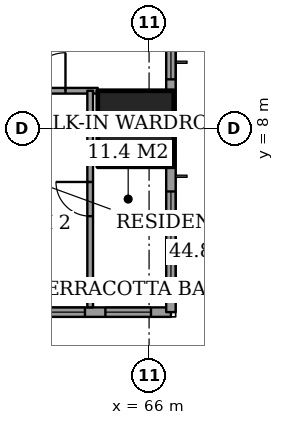
"""IFC4 building model, lengths in metres.
Left out: names, types, materials, properties, quantities, classifications, styles, units other than length and angle.
Written with IfcOpenShell. Run it as: python <this file> out.ifc"""

import sys

from ifc_helpers import new_model, si_unit, direction, frame, frame_2d, origin, origin_2d, place, context, subcontext, project, spatial, rectangle, extrude, element, fill, save


model = new_model("IFC4")
c1 = context("Model", 3, precision=1e-05, world=origin(), true_north=direction((0.0, 1.0)))
c2 = subcontext(c1, "Body", "Model", "MODEL_VIEW")
j1 = project(units=[si_unit("LENGTHUNIT", "METRE"), si_unit("PLANEANGLEUNIT", "RADIAN")], contexts=[c1])
p1 = place(None, origin())
s1 = spatial("IfcSite", under=j1, at=p1, CompositionType="ELEMENT")
p2 = place(p1, origin())
s2 = spatial("IfcBuilding", under=s1, at=p2, CompositionType="ELEMENT")
p3 = place(p2, frame((0.0, 0.0, 47.6)))
s3 = spatial("IfcBuildingStorey", under=s2, at=p3, CompositionType="ELEMENT", Elevation=47.6)
p4 = place(p3, frame((65.65, 8.0, 0.0), z_axis=(0.0, 0.0, 1.0), x_axis=(1.0, 0.0, 0.0)))
e1 = element("IfcColumn", 1, at=p4, inside=s3, PredefinedType="COLUMN", context=c2, shape_type="SweptSolid", body=[
    extrude(rectangle(XDim=2.0, YDim=2.0, at=origin_2d()), origin(), (0.0, 0.0, 1.0), 3.6),
])
p5 = place(p3, frame((62.825, 3.175, 0.0), z_axis=(0.0, 0.0, 1.0), x_axis=(1.0, 0.0, 0.0)))
e2 = element("IfcWall", 2, at=p5, inside=s3, PredefinedType="SOLIDWALL", context=c2, shape_type="SweptSolid", body=[
    extrude(rectangle(XDim=3.75, YDim=0.25, at=frame_2d((1.875, 0.0))), origin(), (0.0, 0.0, 1.0), 3.6),
])
p6 = place(p5, frame((0.288, 0.0, 0.6)))
e3 = element("IfcOpeningElement", 3, at=p6, cuts=e2, PredefinedType="OPENING", context=c2, shape_type="SweptSolid", body=[
    extrude(rectangle(XDim=1.2, YDim=2.0, at=frame_2d((0.6, 1.0))), frame((0.0, 0.135, 0.0), z_axis=(0.0, -1.0, 0.0), x_axis=(1.0, 0.0, 0.0)), (0.0, 0.0, 1.0), 0.27),
])
p7 = place(p5, frame((2.025, 0.0, 0.6)))
e4 = element("IfcOpeningElement", 4, at=p7, cuts=e2, PredefinedType="OPENING", context=c2, shape_type="SweptSolid", body=[
    extrude(rectangle(XDim=1.2, YDim=2.0, at=frame_2d((0.6, 1.0))), frame((0.0, 0.135, 0.0), z_axis=(0.0, -1.0, 0.0), x_axis=(1.0, 0.0, 0.0)), (0.0, 0.0, 1.0), 0.27),
])
p8 = place(p3, frame((66.575, 3.175, 0.0), z_axis=(0.0, 0.0, 1.0), x_axis=(0.0, 1.0, 0.0)))
e5 = element("IfcWall", 5, at=p8, inside=s3, PredefinedType="SOLIDWALL", context=c2, shape_type="SweptSolid", body=[
    extrude(rectangle(XDim=41.65, YDim=0.25, at=frame_2d((20.825, 0.0))), origin(), (0.0, 0.0, 1.0), 3.6),
])
p9 = place(p8, frame((0.775, 0.0, 0.6)))
e6 = element("IfcOpeningElement", 6, at=p9, cuts=e5, PredefinedType="OPENING", context=c2, shape_type="SweptSolid", body=[
    extrude(rectangle(XDim=2.4, YDim=2.0, at=frame_2d((1.2, 1.0))), frame((0.0, 0.135, 0.0), z_axis=(0.0, -1.0, 0.0), x_axis=(1.0, 0.0, 0.0)), (0.0, 0.0, 1.0), 0.27),
])
p10 = place(p8, frame((6.125, 0.0, 0.6)))
e7 = element("IfcOpeningElement", 7, at=p10, cuts=e5, PredefinedType="OPENING", context=c2, shape_type="SweptSolid", body=[
    extrude(rectangle(XDim=1.2, YDim=2.0, at=frame_2d((0.6, 1.0))), frame((0.0, 0.135, 0.0), z_axis=(0.0, -1.0, 0.0), x_axis=(1.0, 0.0, 0.0)), (0.0, 0.0, 1.0), 0.27),
])
p11 = place(p8, frame((8.375, 0.0, 0.6)))
e8 = element("IfcOpeningElement", 8, at=p11, cuts=e5, PredefinedType="OPENING", context=c2, shape_type="SweptSolid", body=[
    extrude(rectangle(XDim=2.4, YDim=2.0, at=frame_2d((1.2, 1.0))), frame((0.0, 0.135, 0.0), z_axis=(0.0, -1.0, 0.0), x_axis=(1.0, 0.0, 0.0)), (0.0, 0.0, 1.0), 0.27),
])
p12 = place(p8, frame((15.775, 0.0, 0.6)))
e9 = element("IfcOpeningElement", 9, at=p12, cuts=e5, PredefinedType="OPENING", context=c2, shape_type="SweptSolid", body=[
    extrude(rectangle(XDim=2.4, YDim=2.0, at=frame_2d((1.2, 1.0))), frame((0.0, 0.135, 0.0), z_axis=(0.0, -1.0, 0.0), x_axis=(1.0, 0.0, 0.0)), (0.0, 0.0, 1.0), 0.27),
])
p13 = place(p8, frame((23.475, 0.0, 0.6)))
e10 = element("IfcOpeningElement", 10, at=p13, cuts=e5, PredefinedType="OPENING", context=c2, shape_type="SweptSolid", body=[
    extrude(rectangle(XDim=2.4, YDim=2.0, at=frame_2d((1.2, 1.0))), frame((0.0, 0.135, 0.0), z_axis=(0.0, -1.0, 0.0), x_axis=(1.0, 0.0, 0.0)), (0.0, 0.0, 1.0), 0.27),
])
p14 = place(p8, frame((30.775, 0.0, 0.6)))
e11 = element("IfcOpeningElement", 11, at=p14, cuts=e5, PredefinedType="OPENING", context=c2, shape_type="SweptSolid", body=[
    extrude(rectangle(XDim=2.4, YDim=2.0, at=frame_2d((1.2, 1.0))), frame((0.0, 0.135, 0.0), z_axis=(0.0, -1.0, 0.0), x_axis=(1.0, 0.0, 0.0)), (0.0, 0.0, 1.0), 0.27),
])
p15 = place(p8, frame((34.125, 0.0, 0.6)))
e12 = element("IfcOpeningElement", 12, at=p15, cuts=e5, PredefinedType="OPENING", context=c2, shape_type="SweptSolid", body=[
    extrude(rectangle(XDim=1.2, YDim=2.0, at=frame_2d((0.6, 1.0))), frame((0.0, 0.135, 0.0), z_axis=(0.0, -1.0, 0.0), x_axis=(1.0, 0.0, 0.0)), (0.0, 0.0, 1.0), 0.27),
])
p16 = place(p8, frame((38.475, 0.0, 0.6)))
e13 = element("IfcOpeningElement", 13, at=p16, cuts=e5, PredefinedType="OPENING", context=c2, shape_type="SweptSolid", body=[
    extrude(rectangle(XDim=2.4, YDim=2.0, at=frame_2d((1.2, 1.0))), frame((0.0, 0.135, 0.0), z_axis=(0.0, -1.0, 0.0), x_axis=(1.0, 0.0, 0.0)), (0.0, 0.0, 1.0), 0.27),
])
p17 = place(p3, frame((59.0, 9.0, 0.0), z_axis=(0.0, 0.0, 1.0), x_axis=(1.0, 0.0, 0.0)))
e14 = element("IfcWall", 14, at=p17, inside=s3, PredefinedType="PARTITIONING", context=c2, shape_type="SweptSolid", body=[
    extrude(rectangle(XDim=5.65, YDim=0.15, at=frame_2d((2.825, 0.0))), origin(), (0.0, 0.0, 1.0), 3.35),
])
p18 = place(p17, frame((3.8, 0.0, 0.0)))
e15 = element("IfcOpeningElement", 15, at=p18, cuts=e14, PredefinedType="OPENING", context=c2, shape_type="SweptSolid", body=[
    extrude(rectangle(XDim=1.0, YDim=2.1, at=frame_2d((0.5, 1.05))), frame((0.0, 0.085, 0.0), z_axis=(0.0, -1.0, 0.0), x_axis=(1.0, 0.0, 0.0)), (0.0, 0.0, 1.0), 0.17),
])
p19 = place(p3, frame((64.45, 3.3, 0.0), z_axis=(0.0, 0.0, 1.0), x_axis=(0.0, 1.0, 0.0)))
e16 = element("IfcWall", 16, at=p19, inside=s3, PredefinedType="PARTITIONING", context=c2, shape_type="SweptSolid", body=[
    extrude(rectangle(XDim=5.7, YDim=0.15, at=frame_2d((2.85, 0.0))), origin(), (0.0, 0.0, 1.0), 3.35),
])
p20 = place(p19, frame((2.4, 0.0, 0.0)))
e17 = element("IfcOpeningElement", 17, at=p20, cuts=e16, PredefinedType="OPENING", context=c2, shape_type="SweptSolid", body=[
    extrude(rectangle(XDim=0.9, YDim=2.1, at=frame_2d((0.45, 1.05))), frame((0.0, 0.085, 0.0), z_axis=(0.0, -1.0, 0.0), x_axis=(1.0, 0.0, 0.0)), (0.0, 0.0, 1.0), 0.17),
])
p21 = place(p6, origin())
e18 = element("IfcWindow", 18, at=p21, inside=s3, PartitioningType="SINGLE_PANEL", PredefinedType="WINDOW", context=c2, shape_type="SweptSolid", body=[
    extrude(rectangle(XDim=1.2, YDim=2.0, at=frame_2d((0.6, 1.0))), frame((0.0, 0.03, 0.0), z_axis=(0.0, -1.0, 0.0), x_axis=(1.0, 0.0, 0.0)), (0.0, 0.0, 1.0), 0.06),
])
fill(e3, e18)
p22 = place(p7, origin())
e19 = element("IfcWindow", 19, at=p22, inside=s3, PartitioningType="SINGLE_PANEL", PredefinedType="WINDOW", context=c2, shape_type="SweptSolid", body=[
    extrude(rectangle(XDim=1.2, YDim=2.0, at=frame_2d((0.6, 1.0))), frame((0.0, 0.03, 0.0), z_axis=(0.0, -1.0, 0.0), x_axis=(1.0, 0.0, 0.0)), (0.0, 0.0, 1.0), 0.06),
])
fill(e4, e19)
p23 = place(p9, origin())
e20 = element("IfcWindow", 20, at=p23, inside=s3, PartitioningType="SINGLE_PANEL", PredefinedType="WINDOW", context=c2, shape_type="SweptSolid", body=[
    extrude(rectangle(XDim=2.4, YDim=2.0, at=frame_2d((1.2, 1.0))), frame((0.0, 0.03, 0.0), z_axis=(0.0, -1.0, 0.0), x_axis=(1.0, 0.0, 0.0)), (0.0, 0.0, 1.0), 0.06),
])
fill(e6, e20)
p24 = place(p10, origin())
e21 = element("IfcWindow", 21, at=p24, inside=s3, PartitioningType="SINGLE_PANEL", PredefinedType="WINDOW", context=c2, shape_type="SweptSolid", body=[
    extrude(rectangle(XDim=1.2, YDim=2.0, at=frame_2d((0.6, 1.0))), frame((0.0, 0.03, 0.0), z_axis=(0.0, -1.0, 0.0), x_axis=(1.0, 0.0, 0.0)), (0.0, 0.0, 1.0), 0.06),
])
fill(e7, e21)
p25 = place(p20, origin())
e22 = element("IfcDoor", 22, at=p25, inside=s3, OperationType="SINGLE_SWING_LEFT", PredefinedType="DOOR", context=c2, shape_type="SweptSolid", body=[
    extrude(rectangle(XDim=0.9, YDim=2.1, at=frame_2d((0.45, 1.05))), frame((0.0, 0.025, 0.0), z_axis=(0.0, -1.0, 0.0), x_axis=(1.0, 0.0, 0.0)), (0.0, 0.0, 1.0), 0.05),
])
fill(e17, e22)
p26 = place(p18, origin())
e23 = element("IfcDoor", 23, at=p26, inside=s3, OperationType="SINGLE_SWING_LEFT", PredefinedType="DOOR", context=c2, shape_type="SweptSolid", body=[
    extrude(rectangle(XDim=1.0, YDim=2.1, at=frame_2d((0.5, 1.05))), frame((0.0, 0.025, 0.0), z_axis=(0.0, -1.0, 0.0), x_axis=(1.0, 0.0, 0.0)), (0.0, 0.0, 1.0), 0.05),
])
fill(e15, e23)
save(model, sys.argv[1])
